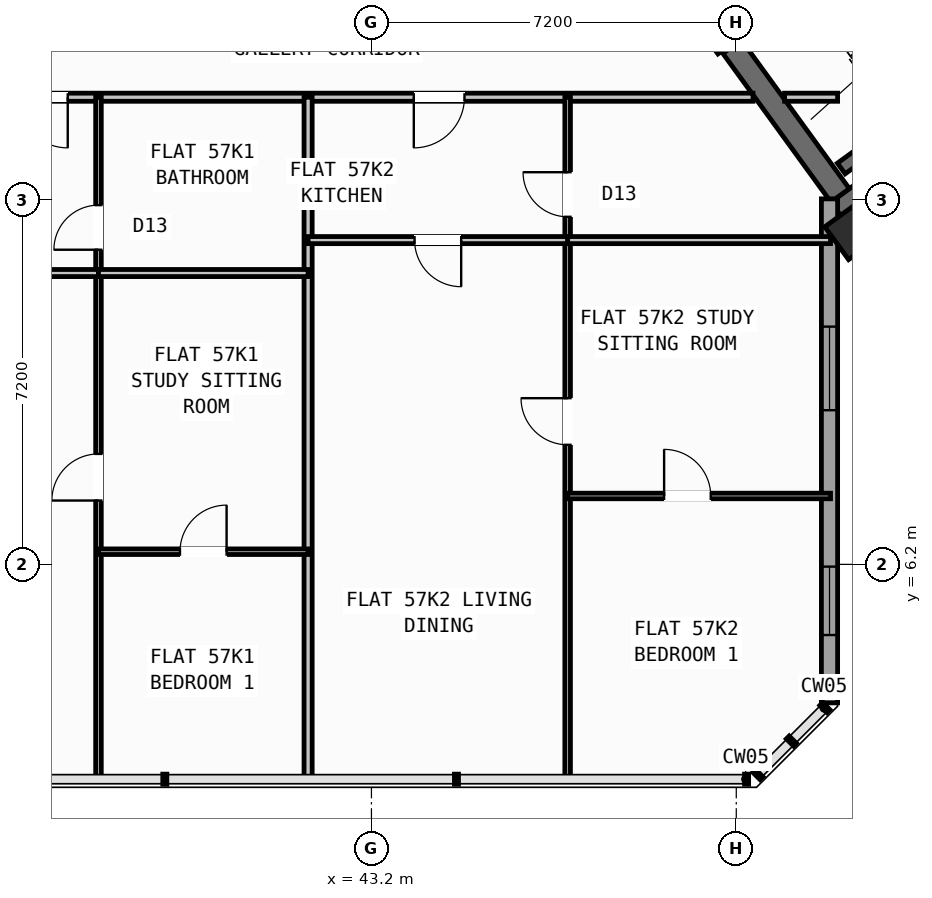
"""IFC4 building model, lengths in metres.
Left out: names, types, materials, properties, quantities, classifications, styles, units other than length and angle.
Written with IfcOpenShell. Run it as: python <this file> out.ifc"""

import sys

from ifc_helpers import new_model, si_unit, direction, frame, frame_2d, origin, origin_2d, place, context, subcontext, project, spatial, rectangle, hollow_rectangle, extrude, source, transform, mapped, element, fill, save


model = new_model("IFC4")
c1 = context("Model", 3, precision=1e-05, world=origin(), true_north=direction((0.0, 1.0)))
c2 = subcontext(c1, "Body", "Model", "MODEL_VIEW")
j1 = project(units=[si_unit("LENGTHUNIT", "METRE"), si_unit("PLANEANGLEUNIT", "RADIAN")], contexts=[c1])
p1 = place(None, origin())
s1 = spatial("IfcSite", under=j1, at=p1, CompositionType="ELEMENT")
p2 = place(p1, origin())
s2 = spatial("IfcBuilding", under=s1, at=p2, CompositionType="ELEMENT")
p3 = place(p2, frame((0.0, 0.0, 225.6)))
s3 = spatial("IfcBuildingStorey", under=s2, at=p3, CompositionType="ELEMENT", Elevation=225.6)
p4 = place(p3, frame((52.399, 13.169, 0.0), z_axis=(0.0, 0.0, 1.0), x_axis=(0.809022352778, 0.587777877013, 0.0)))
e1 = element("IfcWall", 1, at=p4, inside=s3, PredefinedType="SHEAR", context=c2, shape_type="SweptSolid", body=[
    extrude(rectangle(XDim=12.24, YDim=0.45, at=frame_2d((6.12, 0.0))), origin(), (0.0, 0.0, 1.0), 3.35),
])
p5 = place(p3, frame((52.449, 13.483, 0.0), z_axis=(0.0, 0.0, 1.0), x_axis=(-0.587819244441, 0.808992296542, 0.0)))
e2 = element("IfcWall", 2, at=p5, inside=s3, PredefinedType="SHEAR", context=c2, shape_type="SweptSolid", body=[
    extrude(rectangle(XDim=3.625, YDim=0.45, at=frame_2d((1.812, 0.0))), origin(), (0.0, 0.0, 1.0), 3.35),
])
m1 = source(origin(), c2, "Body", "SweptSolid", [
    extrude(hollow_rectangle(XDim=0.8, YDim=0.8, WallThickness=0.032, at=origin_2d()), origin(), (0.0, 0.0, 1.0), 3.6),
])
p6 = place(p3, frame((52.705, 12.773, 0.0), z_axis=(0.0, 0.0, 1.0), x_axis=(0.809016994375, 0.587785252292, 0.0)))
e3 = element("IfcColumn", 3, at=p6, inside=s3, PredefinedType="COLUMN", context=c2, shape_type="MappedRepresentation", body=[
    mapped(m1, transform((0.0, 0.0, 0.0), scale=1.0)),
])
p7 = place(p3, frame((52.24, 13.414, 0.0), z_axis=(0.0, 0.0, 1.0), x_axis=(0.0, -1.0, 0.0)))
e4 = element("IfcWall", 4, at=p7, inside=s3, PredefinedType="STANDARD", context=c2, shape_type="SweptSolid", body=[
    extrude(rectangle(XDim=9.948, YDim=0.32, at=frame_2d((4.974, 0.0))), origin(), (0.0, 0.0, 1.0), 3.35),
])
p8 = place(p7, frame((2.521, 0.0, 0.9)))
e5 = element("IfcOpeningElement", 5, at=p8, cuts=e4, PredefinedType="OPENING", context=c2, shape_type="SweptSolid", body=[
    extrude(rectangle(XDim=1.65, YDim=1.45, at=frame_2d((0.825, 0.725))), frame((0.0, 0.17, 0.0), z_axis=(0.0, -1.0, 0.0), x_axis=(1.0, 0.0, 0.0)), (0.0, 0.0, 1.0), 0.34),
])
p9 = place(p7, frame((7.258, 0.0, 0.9)))
e6 = element("IfcOpeningElement", 6, at=p9, cuts=e4, PredefinedType="OPENING", context=c2, shape_type="SweptSolid", body=[
    extrude(rectangle(XDim=1.35, YDim=1.45, at=frame_2d((0.675, 0.725))), frame((0.0, 0.17, 0.0), z_axis=(0.0, -1.0, 0.0), x_axis=(1.0, 0.0, 0.0)), (0.0, 0.0, 1.0), 0.34),
])
p10 = place(p3, frame((52.472, 14.013, 0.0), z_axis=(0.0, 0.0, 1.0), x_axis=(0.809028366311, 0.587769599847, 0.0)))
e7 = element("IfcWall", 7, at=p10, inside=s3, PredefinedType="SHEAR", context=c2, shape_type="SweptSolid", body=[
    extrude(rectangle(XDim=7.33, YDim=0.26, at=frame_2d((3.665, 0.0))), origin(), (0.0, 0.0, 1.0), 3.35),
])
p11 = place(p3, frame((35.178, 15.42, 0.0), z_axis=(0.0, 0.0, 1.0), x_axis=(1.0, 0.0, 0.0)))
e8 = element("IfcWall", 8, at=p11, inside=s3, PredefinedType="PARTITIONING", context=c2, shape_type="SweptSolid", body=[
    extrude(rectangle(XDim=15.552, YDim=0.16, at=frame_2d((7.776, 0.0))), origin(), (0.0, 0.0, 1.0), 3.34),
])
p12 = place(p11, frame((1.028, 0.0, 0.0)))
e9 = element("IfcOpeningElement", 9, at=p12, cuts=e8, PredefinedType="OPENING", context=c2, shape_type="SweptSolid", body=[
    extrude(rectangle(XDim=1.0, YDim=2.1, at=frame_2d((0.5, 1.05))), frame((0.0, 0.09, 0.0), z_axis=(0.0, -1.0, 0.0), x_axis=(1.0, 0.0, 0.0)), (0.0, 0.0, 1.0), 0.18),
])
p13 = place(p11, frame((8.858, 0.0, 0.0)))
e10 = element("IfcOpeningElement", 10, at=p13, cuts=e8, PredefinedType="OPENING", context=c2, shape_type="SweptSolid", body=[
    extrude(rectangle(XDim=1.0, YDim=2.1, at=frame_2d((0.5, 1.05))), frame((0.0, 0.09, 0.0), z_axis=(0.0, -1.0, 0.0), x_axis=(1.0, 0.0, 0.0)), (0.0, 0.0, 1.0), 0.18),
])
p14 = place(p3, frame((51.354, 15.42, 0.0), z_axis=(0.0, 0.0, 1.0), x_axis=(1.0, 0.0, 0.0)))
e11 = element("IfcWall", 11, at=p14, inside=s3, PredefinedType="PARTITIONING", context=c2, shape_type="SweptSolid", body=[
    extrude(rectangle(XDim=1.046, YDim=0.16, at=frame_2d((0.523, 0.0))), origin(), (0.0, 0.0, 1.0), 3.34),
])
p15 = place(p3, frame((50.119, 16.333, 0.0), z_axis=(0.0, 0.0, 1.0), x_axis=(-0.587749856981, 0.809042709391, 0.0)))
e12 = element("IfcWall", 12, at=p15, inside=s3, PredefinedType="STANDARD", context=c2, shape_type="SweptSolid", body=[
    extrude(rectangle(XDim=2.96, YDim=0.2, at=frame_2d((1.48, 0.0))), origin(), (0.0, 0.0, 1.0), 3.34),
])
p16 = place(p15, frame((0.53, 0.0, 0.0)))
e13 = element("IfcOpeningElement", 13, at=p16, cuts=e12, PredefinedType="OPENING", context=c2, shape_type="SweptSolid", body=[
    extrude(rectangle(XDim=1.5, YDim=2.15, at=frame_2d((0.75, 1.075))), frame((0.0, 0.11, 0.0), z_axis=(0.0, -1.0, 0.0), x_axis=(1.0, 0.0, 0.0)), (0.0, 0.0, 1.0), 0.22),
])
p17 = place(p3, frame((41.95, 1.96, 0.0), z_axis=(0.0, 0.0, 1.0), x_axis=(0.0, 1.0, 0.0)))
e14 = element("IfcWall", 14, at=p17, inside=s3, PredefinedType="PARTITIONING", context=c2, shape_type="SweptSolid", body=[
    extrude(rectangle(XDim=13.46, YDim=0.16, at=frame_2d((6.73, 0.0))), origin(), (0.0, 0.0, 1.0), 3.34),
])
p18 = place(p3, frame((37.813, 1.96, 0.0), z_axis=(0.0, 0.0, 1.0), x_axis=(0.0, 1.0, 0.0)))
e15 = element("IfcWall", 15, at=p18, inside=s3, PredefinedType="PARTITIONING", context=c2, shape_type="SweptSolid", body=[
    extrude(rectangle(XDim=13.46, YDim=0.11, at=frame_2d((6.73, 0.0))), origin(), (0.0, 0.0, 1.0), 3.34),
])
p19 = place(p18, frame((5.5, 0.0, 0.0)))
e16 = element("IfcOpeningElement", 16, at=p19, cuts=e15, PredefinedType="OPENING", context=c2, shape_type="SweptSolid", body=[
    extrude(rectangle(XDim=0.92, YDim=2.08, at=frame_2d((0.46, 1.04))), frame((0.0, 0.065, 0.0), z_axis=(0.0, -1.0, 0.0), x_axis=(1.0, 0.0, 0.0)), (0.0, 0.0, 1.0), 0.13),
])
p20 = place(p18, frame((10.45, 0.0, 0.0)))
e17 = element("IfcOpeningElement", 17, at=p20, cuts=e15, PredefinedType="OPENING", context=c2, shape_type="SweptSolid", body=[
    extrude(rectangle(XDim=0.88, YDim=2.08, at=frame_2d((0.44, 1.04))), frame((0.0, 0.065, 0.0), z_axis=(0.0, -1.0, 0.0), x_axis=(1.0, 0.0, 0.0)), (0.0, 0.0, 1.0), 0.13),
])
p21 = place(p3, frame((33.447, 11.95, 0.0), z_axis=(0.0, 0.0, 1.0), x_axis=(1.0, 0.0, 0.0)))
e18 = element("IfcWall", 18, at=p21, inside=s3, PredefinedType="PLUMBINGWALL", context=c2, shape_type="SweptSolid", body=[
    extrude(rectangle(XDim=4.366, YDim=0.14, at=frame_2d((2.183, 0.0))), origin(), (0.0, 0.0, 1.0), 2.525),
])
p22 = place(p21, frame((1.05, 0.0, 0.0)))
e19 = element("IfcOpeningElement", 19, at=p22, cuts=e18, PredefinedType="OPENING", context=c2, shape_type="SweptSolid", body=[
    extrude(rectangle(XDim=0.92, YDim=2.08, at=frame_2d((0.46, 1.04))), frame((0.0, 0.08, 0.0), z_axis=(0.0, -1.0, 0.0), x_axis=(1.0, 0.0, 0.0)), (0.0, 0.0, 1.0), 0.16),
])
p23 = place(p3, frame((37.813, 11.95, 0.0), z_axis=(0.0, 0.0, 1.0), x_axis=(1.0, 0.0, 0.0)))
e20 = element("IfcWall", 20, at=p23, inside=s3, PredefinedType="PLUMBINGWALL", context=c2, shape_type="SweptSolid", body=[
    extrude(rectangle(XDim=4.137, YDim=0.14, at=frame_2d((2.068, 0.0))), origin(), (0.0, 0.0, 1.0), 2.525),
])
p24 = place(p3, frame((37.813, 6.45, 0.0), z_axis=(0.0, 0.0, 1.0), x_axis=(1.0, 0.0, 0.0)))
e21 = element("IfcWall", 21, at=p24, inside=s3, PredefinedType="PARTITIONING", context=c2, shape_type="SweptSolid", body=[
    extrude(rectangle(XDim=4.137, YDim=0.11, at=frame_2d((2.068, 0.0))), origin(), (0.0, 0.0, 1.0), 3.34),
])
p25 = place(p24, frame((1.608, 0.0, 0.0)))
e22 = element("IfcOpeningElement", 22, at=p25, cuts=e21, PredefinedType="OPENING", context=c2, shape_type="SweptSolid", body=[
    extrude(rectangle(XDim=0.92, YDim=2.08, at=frame_2d((0.46, 1.04))), frame((0.0, 0.065, 0.0), z_axis=(0.0, -1.0, 0.0), x_axis=(1.0, 0.0, 0.0)), (0.0, 0.0, 1.0), 0.13),
])
p26 = place(p3, frame((47.072, 1.96, 0.0), z_axis=(0.0, 0.0, 1.0), x_axis=(0.0, 1.0, 0.0)))
e23 = element("IfcWall", 23, at=p26, inside=s3, PredefinedType="PARTITIONING", context=c2, shape_type="SweptSolid", body=[
    extrude(rectangle(XDim=13.46, YDim=0.11, at=frame_2d((6.73, 0.0))), origin(), (0.0, 0.0, 1.0), 3.34),
])
p27 = place(p26, frame((6.6, 0.0, 0.0)))
e24 = element("IfcOpeningElement", 24, at=p27, cuts=e23, PredefinedType="OPENING", context=c2, shape_type="SweptSolid", body=[
    extrude(rectangle(XDim=0.92, YDim=2.08, at=frame_2d((0.46, 1.04))), frame((0.0, 0.065, 0.0), z_axis=(0.0, -1.0, 0.0), x_axis=(1.0, 0.0, 0.0)), (0.0, 0.0, 1.0), 0.13),
])
p28 = place(p26, frame((11.1, 0.0, 0.0)))
e25 = element("IfcOpeningElement", 25, at=p28, cuts=e23, PredefinedType="OPENING", context=c2, shape_type="SweptSolid", body=[
    extrude(rectangle(XDim=0.88, YDim=2.08, at=frame_2d((0.44, 1.04))), frame((0.0, 0.065, 0.0), z_axis=(0.0, -1.0, 0.0), x_axis=(1.0, 0.0, 0.0)), (0.0, 0.0, 1.0), 0.13),
])
p29 = place(p3, frame((41.95, 12.6, 0.0), z_axis=(0.0, 0.0, 1.0), x_axis=(1.0, 0.0, 0.0)))
e26 = element("IfcWall", 26, at=p29, inside=s3, PredefinedType="PLUMBINGWALL", context=c2, shape_type="SweptSolid", body=[
    extrude(rectangle(XDim=5.122, YDim=0.14, at=frame_2d((2.561, 0.0))), origin(), (0.0, 0.0, 1.0), 2.525),
])
p30 = place(p29, frame((2.101, 0.0, 0.0)))
e27 = element("IfcOpeningElement", 27, at=p30, cuts=e26, PredefinedType="OPENING", context=c2, shape_type="SweptSolid", body=[
    extrude(rectangle(XDim=0.92, YDim=2.08, at=frame_2d((0.46, 1.04))), frame((0.0, 0.08, 0.0), z_axis=(0.0, -1.0, 0.0), x_axis=(1.0, 0.0, 0.0)), (0.0, 0.0, 1.0), 0.16),
])
p31 = place(p3, frame((47.072, 12.6, 0.0), z_axis=(0.0, 0.0, 1.0), x_axis=(1.0, 0.0, 0.0)))
e28 = element("IfcWall", 28, at=p31, inside=s3, PredefinedType="PLUMBINGWALL", context=c2, shape_type="SweptSolid", body=[
    extrude(rectangle(XDim=5.188, YDim=0.14, at=frame_2d((2.594, 0.0))), origin(), (0.0, 0.0, 1.0), 2.525),
])
p32 = place(p3, frame((47.072, 7.55, 0.0), z_axis=(0.0, 0.0, 1.0), x_axis=(1.0, 0.0, 0.0)))
e29 = element("IfcWall", 29, at=p32, inside=s3, PredefinedType="PARTITIONING", context=c2, shape_type="SweptSolid", body=[
    extrude(rectangle(XDim=5.188, YDim=0.11, at=frame_2d((2.594, 0.0))), origin(), (0.0, 0.0, 1.0), 3.34),
])
p33 = place(p32, frame((1.904, 0.0, 0.0)))
e30 = element("IfcOpeningElement", 30, at=p33, cuts=e29, PredefinedType="OPENING", context=c2, shape_type="SweptSolid", body=[
    extrude(rectangle(XDim=0.92, YDim=2.08, at=frame_2d((0.46, 1.04))), frame((0.0, 0.065, 0.0), z_axis=(0.0, -1.0, 0.0), x_axis=(1.0, 0.0, 0.0)), (0.0, 0.0, 1.0), 0.13),
])
m2 = source(origin(), c2, "Body", "SweptSolid", [
    extrude(rectangle(XDim=1.65, YDim=1.45, at=frame_2d((0.825, 0.725))), frame((0.0, 0.03, 0.0), z_axis=(0.0, -1.0, 0.0), x_axis=(1.0, 0.0, 0.0)), (0.0, 0.0, 1.0), 0.06),
])
p34 = place(p8, origin())
e31 = element("IfcWindow", 31, at=p34, inside=s3, PartitioningType="SINGLE_PANEL", PredefinedType="WINDOW", context=c2, shape_type="MappedRepresentation", body=[
    mapped(m2, transform((0.0, 0.0, 0.0), scale=1.0)),
])
fill(e5, e31)
m3 = source(origin(), c2, "Body", "SweptSolid", [
    extrude(rectangle(XDim=1.35, YDim=1.45, at=frame_2d((0.675, 0.725))), frame((0.0, 0.03, 0.0), z_axis=(0.0, -1.0, 0.0), x_axis=(1.0, 0.0, 0.0)), (0.0, 0.0, 1.0), 0.06),
])
p35 = place(p9, origin())
e32 = element("IfcWindow", 32, at=p35, inside=s3, PartitioningType="SINGLE_PANEL", PredefinedType="WINDOW", context=c2, shape_type="MappedRepresentation", body=[
    mapped(m3, transform((0.0, 0.0, 0.0), scale=1.0)),
])
fill(e6, e32)
m4 = source(origin(), c2, "Body", "SweptSolid", [
    extrude(rectangle(XDim=0.92, YDim=2.08, at=frame_2d((0.46, 1.04))), frame((0.0, 0.025, 0.0), z_axis=(0.0, -1.0, 0.0), x_axis=(1.0, 0.0, 0.0)), (0.0, 0.0, 1.0), 0.05),
])
p36 = place(p19, origin())
e33 = element("IfcDoor", 33, at=p36, inside=s3, OperationType="SINGLE_SWING_LEFT", PredefinedType="DOOR", context=c2, shape_type="MappedRepresentation", body=[
    mapped(m4, transform((0.0, 0.0, 0.0), scale=1.0)),
])
fill(e16, e33)
p37 = place(p25, origin())
e34 = element("IfcDoor", 34, at=p37, inside=s3, OperationType="SINGLE_SWING_RIGHT", PredefinedType="DOOR", context=c2, shape_type="MappedRepresentation", body=[
    mapped(m4, transform((0.0, 0.0, 0.0), scale=1.0)),
])
fill(e22, e34)
m5 = source(origin(), c2, "Body", "SweptSolid", [
    extrude(rectangle(XDim=1.0, YDim=2.1, at=frame_2d((0.5, 1.05))), frame((0.0, 0.025, 0.0), z_axis=(0.0, -1.0, 0.0), x_axis=(1.0, 0.0, 0.0)), (0.0, 0.0, 1.0), 0.05),
])
p38 = place(p12, frame((1.0, 0.0, 0.0), z_axis=(0.0, 0.0, 1.0), x_axis=(-1.0, 0.0, 0.0)))
e35 = element("IfcDoor", 35, at=p38, inside=s3, OperationType="SINGLE_SWING_LEFT", PredefinedType="DOOR", context=c2, shape_type="MappedRepresentation", body=[
    mapped(m5, transform((0.0, 0.0, 0.0), scale=1.0)),
])
fill(e9, e35)
m6 = source(origin(), c2, "Body", "SweptSolid", [
    extrude(rectangle(XDim=0.88, YDim=2.08, at=frame_2d((0.44, 1.04))), frame((0.0, 0.025, 0.0), z_axis=(0.0, -1.0, 0.0), x_axis=(1.0, 0.0, 0.0)), (0.0, 0.0, 1.0), 0.05),
])
p39 = place(p20, origin())
e36 = element("IfcDoor", 36, at=p39, inside=s3, OperationType="SINGLE_SWING_LEFT", PredefinedType="DOOR", context=c2, shape_type="MappedRepresentation", body=[
    mapped(m6, transform((0.0, 0.0, 0.0), scale=1.0)),
])
fill(e17, e36)
p40 = place(p27, origin())
e37 = element("IfcDoor", 37, at=p40, inside=s3, OperationType="SINGLE_SWING_RIGHT", PredefinedType="DOOR", context=c2, shape_type="MappedRepresentation", body=[
    mapped(m4, transform((0.0, 0.0, 0.0), scale=1.0)),
])
fill(e24, e37)
p41 = place(p33, origin())
e38 = element("IfcDoor", 38, at=p41, inside=s3, OperationType="SINGLE_SWING_LEFT", PredefinedType="DOOR", context=c2, shape_type="MappedRepresentation", body=[
    mapped(m4, transform((0.0, 0.0, 0.0), scale=1.0)),
])
fill(e30, e38)
p42 = place(p13, frame((1.0, 0.0, 0.0), z_axis=(0.0, 0.0, 1.0), x_axis=(-1.0, 0.0, 0.0)))
e39 = element("IfcDoor", 39, at=p42, inside=s3, OperationType="SINGLE_SWING_RIGHT", PredefinedType="DOOR", context=c2, shape_type="MappedRepresentation", body=[
    mapped(m5, transform((0.0, 0.0, 0.0), scale=1.0)),
])
fill(e10, e39)
p43 = place(p30, frame((0.92, 0.0, 0.0), z_axis=(0.0, 0.0, 1.0), x_axis=(-1.0, 0.0, 0.0)))
e40 = element("IfcDoor", 40, at=p43, inside=s3, OperationType="SINGLE_SWING_LEFT", PredefinedType="DOOR", context=c2, shape_type="MappedRepresentation", body=[
    mapped(m4, transform((0.0, 0.0, 0.0), scale=1.0)),
])
fill(e27, e40)
p44 = place(p28, origin())
e41 = element("IfcDoor", 41, at=p44, inside=s3, OperationType="SINGLE_SWING_RIGHT", PredefinedType="DOOR", context=c2, shape_type="MappedRepresentation", body=[
    mapped(m6, transform((0.0, 0.0, 0.0), scale=1.0)),
])
fill(e25, e41)
save(model, sys.argv[1])
